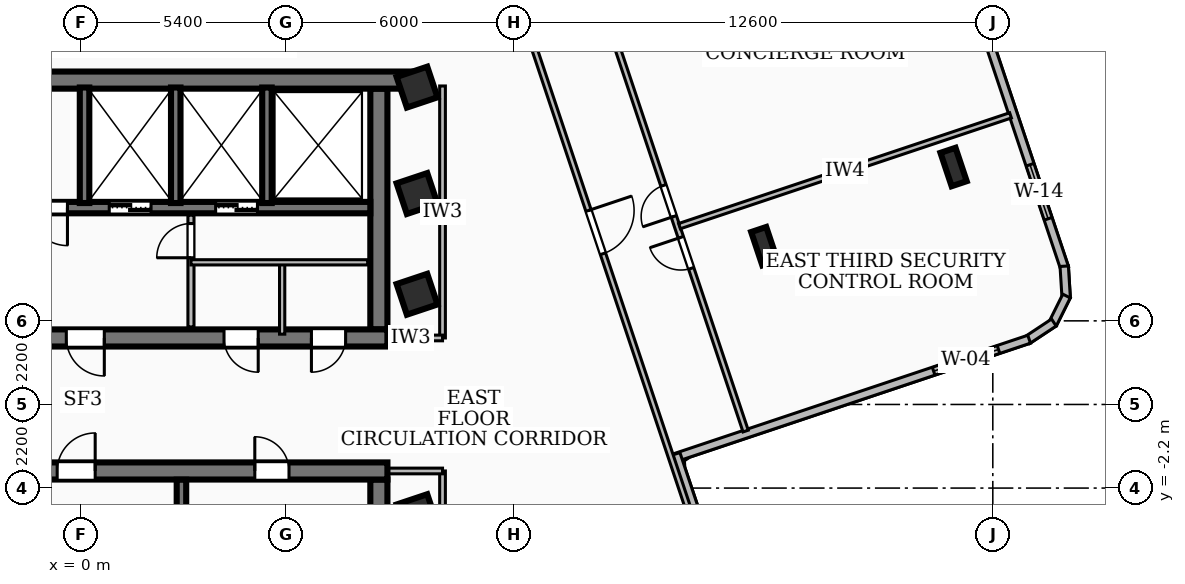
"""IFC4 building model, lengths in metres.
Left out: names, types, materials, properties, quantities, classifications, styles, units other than length and angle.
Written with IfcOpenShell. Run it as: python <this file> out.ifc"""

import sys

from ifc_helpers import new_model, si_unit, direction, frame, frame_2d, origin, origin_2d, place, context, subcontext, project, spatial, rectangle, i_section, extrude, element, fill, save


model = new_model("IFC4")
c1 = context("Model", 3, precision=1e-05, world=origin(), true_north=direction((0.0, 1.0)))
c2 = subcontext(c1, "Body", "Model", "MODEL_VIEW")
j1 = project(units=[si_unit("LENGTHUNIT", "METRE"), si_unit("PLANEANGLEUNIT", "RADIAN")], contexts=[c1])
p1 = place(None, origin())
s1 = spatial("IfcSite", under=j1, at=p1, CompositionType="ELEMENT")
p2 = place(p1, origin())
s2 = spatial("IfcBuilding", under=s1, at=p2, CompositionType="ELEMENT")
p3 = place(p2, frame((0.0, 0.0, 159.48)))
s3 = spatial("IfcBuildingStorey", under=s2, at=p3, CompositionType="ELEMENT", Elevation=159.48)
p4 = place(p3, frame((-8.78, 8.535, 0.0), z_axis=(0.0, 0.0, 1.0), x_axis=(1.0, 0.0, 0.0)))
e1 = element("IfcWall", 1, at=p4, inside=s3, PredefinedType="SHEAR", context=c2, shape_type="SweptSolid", body=[
    extrude(rectangle(XDim=17.56, YDim=0.45, at=frame_2d((8.78, 0.0))), origin(), (0.0, 0.0, 1.0), 3.34),
])
p5 = place(p3, frame((8.07, 1.75, 0.0), z_axis=(0.0, 0.0, 1.0), x_axis=(-1.0, 0.0, 0.0)))
e2 = element("IfcWall", 2, at=p5, inside=s3, PredefinedType="SHEAR", context=c2, shape_type="SweptSolid", body=[
    extrude(rectangle(XDim=16.14, YDim=0.45, at=frame_2d((8.07, 0.0))), origin(), (0.0, 0.0, 1.0), 3.34),
])
p6 = place(p5, frame((7.45, 0.0, 0.0)))
e3 = element("IfcOpeningElement", 3, at=p6, cuts=e2, PredefinedType="OPENING", context=c2, shape_type="SweptSolid", body=[
    extrude(rectangle(XDim=1.0, YDim=2.1, at=frame_2d((0.5, 1.05))), frame((0.0, 0.235, 0.0), z_axis=(0.0, -1.0, 0.0), x_axis=(1.0, 0.0, 0.0)), (0.0, 0.0, 1.0), 0.47),
])
p7 = place(p5, frame((3.4, 0.0, 0.0)))
e4 = element("IfcOpeningElement", 4, at=p7, cuts=e2, PredefinedType="OPENING", context=c2, shape_type="SweptSolid", body=[
    extrude(rectangle(XDim=0.9, YDim=2.06, at=frame_2d((0.45, 1.03))), frame((0.0, 0.235, 0.0), z_axis=(0.0, -1.0, 0.0), x_axis=(1.0, 0.0, 0.0)), (0.0, 0.0, 1.0), 0.47),
])
p8 = place(p5, frame((1.1, 0.0, 0.0)))
e5 = element("IfcOpeningElement", 5, at=p8, cuts=e2, PredefinedType="OPENING", context=c2, shape_type="SweptSolid", body=[
    extrude(rectangle(XDim=0.9, YDim=2.06, at=frame_2d((0.45, 1.03))), frame((0.0, 0.235, 0.0), z_axis=(0.0, -1.0, 0.0), x_axis=(1.0, 0.0, 0.0)), (0.0, 0.0, 1.0), 0.47),
])
p9 = place(p3, frame((7.845, 8.31, 0.0), z_axis=(0.0, 0.0, 1.0), x_axis=(0.0, -1.0, 0.0)))
e6 = element("IfcWall", 6, at=p9, inside=s3, PredefinedType="SHEAR", context=c2, shape_type="SweptSolid", body=[
    extrude(rectangle(XDim=6.335, YDim=0.45, at=frame_2d((3.167, 0.0))), origin(), (0.0, 0.0, 1.0), 3.34),
])
p10 = place(p3, frame((7.62, 5.18, 0.0), z_axis=(0.0, 0.0, 1.0), x_axis=(-1.0, 0.0, 0.0)))
e7 = element("IfcWall", 7, at=p10, inside=s3, PredefinedType="SOLIDWALL", context=c2, shape_type="SweptSolid", body=[
    extrude(rectangle(XDim=15.24, YDim=0.3, at=frame_2d((7.62, 0.0))), origin(), (0.0, 0.0, 1.0), 3.34),
])
p11 = place(p10, frame((5.77, 0.0, 0.0)))
e8 = element("IfcOpeningElement", 8, at=p11, cuts=e7, PredefinedType="OPENING", context=c2, shape_type="SweptSolid", body=[
    extrude(rectangle(XDim=1.1, YDim=2.15, at=frame_2d((0.55, 1.075))), frame((0.0, 0.16, 0.0), z_axis=(0.0, -1.0, 0.0), x_axis=(1.0, 0.0, 0.0)), (0.0, 0.0, 1.0), 0.32),
])
p12 = place(p10, frame((2.97, 0.0, 0.0)))
e9 = element("IfcOpeningElement", 9, at=p12, cuts=e7, PredefinedType="OPENING", context=c2, shape_type="SweptSolid", body=[
    extrude(rectangle(XDim=1.1, YDim=2.15, at=frame_2d((0.55, 1.075))), frame((0.0, 0.16, 0.0), z_axis=(0.0, -1.0, 0.0), x_axis=(1.0, 0.0, 0.0)), (0.0, 0.0, 1.0), 0.32),
])
p13 = place(p10, frame((7.97, 0.0, 0.0)))
e10 = element("IfcOpeningElement", 10, at=p13, cuts=e7, PredefinedType="OPENING", context=c2, shape_type="SweptSolid", body=[
    extrude(rectangle(XDim=1.0, YDim=2.1, at=frame_2d((0.5, 1.05))), frame((0.0, 0.16, 0.0), z_axis=(0.0, -1.0, 0.0), x_axis=(1.0, 0.0, 0.0)), (0.0, 0.0, 1.0), 0.32),
])
p14 = place(p3, frame((-8.07, -1.75, 0.0), z_axis=(0.0, 0.0, 1.0), x_axis=(1.0, 0.0, 0.0)))
e11 = element("IfcWall", 11, at=p14, inside=s3, PredefinedType="SHEAR", context=c2, shape_type="SweptSolid", body=[
    extrude(rectangle(XDim=16.14, YDim=0.45, at=frame_2d((8.07, 0.0))), origin(), (0.0, 0.0, 1.0), 3.34),
])
p15 = place(p14, frame((7.45, 0.0, 0.0)))
e12 = element("IfcOpeningElement", 12, at=p15, cuts=e11, PredefinedType="OPENING", context=c2, shape_type="SweptSolid", body=[
    extrude(rectangle(XDim=1.0, YDim=2.1, at=frame_2d((0.5, 1.05))), frame((0.0, 0.235, 0.0), z_axis=(0.0, -1.0, 0.0), x_axis=(1.0, 0.0, 0.0)), (0.0, 0.0, 1.0), 0.47),
])
p16 = place(p14, frame((12.65, 0.0, 0.0)))
e13 = element("IfcOpeningElement", 13, at=p16, cuts=e11, PredefinedType="OPENING", context=c2, shape_type="SweptSolid", body=[
    extrude(rectangle(XDim=0.9, YDim=2.06, at=frame_2d((0.45, 1.03))), frame((0.0, 0.235, 0.0), z_axis=(0.0, -1.0, 0.0), x_axis=(1.0, 0.0, 0.0)), (0.0, 0.0, 1.0), 0.47),
])
p17 = place(p14, frame((0.565, 0.0, 0.0)))
e14 = element("IfcOpeningElement", 14, at=p17, cuts=e11, PredefinedType="OPENING", context=c2, shape_type="SweptSolid", body=[
    extrude(rectangle(XDim=1.05, YDim=2.15, at=frame_2d((0.525, 1.075))), frame((0.0, 0.235, 0.0), z_axis=(0.0, -1.0, 0.0), x_axis=(1.0, 0.0, 0.0)), (0.0, 0.0, 1.0), 0.47),
])
p18 = place(p14, frame((2.125, 0.0, 0.0)))
e15 = element("IfcOpeningElement", 15, at=p18, cuts=e11, PredefinedType="OPENING", context=c2, shape_type="SweptSolid", body=[
    extrude(rectangle(XDim=1.05, YDim=2.15, at=frame_2d((0.525, 1.075))), frame((0.0, 0.235, 0.0), z_axis=(0.0, -1.0, 0.0), x_axis=(1.0, 0.0, 0.0)), (0.0, 0.0, 1.0), 0.47),
])
p19 = place(p14, frame((3.685, 0.0, 0.0)))
e16 = element("IfcOpeningElement", 16, at=p19, cuts=e11, PredefinedType="OPENING", context=c2, shape_type="SweptSolid", body=[
    extrude(rectangle(XDim=1.05, YDim=2.15, at=frame_2d((0.525, 1.075))), frame((0.0, 0.235, 0.0), z_axis=(0.0, -1.0, 0.0), x_axis=(1.0, 0.0, 0.0)), (0.0, 0.0, 1.0), 0.47),
])
p20 = place(p3, frame((7.845, -1.975, 0.0), z_axis=(0.0, 0.0, 1.0), x_axis=(0.0, -1.0, 0.0)))
e17 = element("IfcWall", 17, at=p20, inside=s3, PredefinedType="SHEAR", context=c2, shape_type="SweptSolid", body=[
    extrude(rectangle(XDim=6.335, YDim=0.45, at=frame_2d((3.167, 0.0))), origin(), (0.0, 0.0, 1.0), 3.34),
])
for number, where, z_axis, x_axis in (
    (18, (0.1, 5.3, 0.0), (0.0, 0.0, 1.0), (0.0, 1.0, 0.0)),
    (19, (2.5, 5.3, 0.0), (0.0, 0.0, 1.0), (0.0, 1.0, 0.0)),
    (20, (4.9, 5.3, 0.0), (0.0, 0.0, 1.0), (0.0, 1.0, 0.0)),
):
    element("IfcWall", number, at=place(p3, frame(where, z_axis=z_axis, x_axis=x_axis)), inside=s3, PredefinedType="SOLIDWALL", context=c2, shape_type="SweptSolid", body=[
        extrude(rectangle(XDim=3.04, YDim=0.25, at=frame_2d((1.52, 0.0))), origin(), (0.0, 0.0, 1.0), 3.34),
    ])
p21 = place(p3, frame((2.65, -5.05, 0.0), z_axis=(0.0, 0.0, 1.0), x_axis=(0.0, 1.0, 0.0)))
e21 = element("IfcWall", 21, at=p21, inside=s3, PredefinedType="SOLIDWALL", context=c2, shape_type="SweptSolid", body=[
    extrude(rectangle(XDim=3.07, YDim=0.25, at=frame_2d((1.535, 0.0))), origin(), (0.0, 0.0, 1.0), 3.34),
])
for number, where, z_axis, x_axis in (
    (22, (8.85, -2.9, 0.0), (0.0, 0.0, 1.0), (0.948, 0.317, 0.0)),
    (23, (8.85, 2.9, 0.0), (0.0, 0.0, 1.0), (0.948, 0.317, 0.0)),
    (24, (8.85, 5.55, 0.0), (0.0, 0.0, 1.0), (0.948, 0.317, 0.0)),
    (25, (8.85, 8.35, 0.0), (0.0, 0.0, 1.0), (0.948, 0.317, 0.0)),
):
    element("IfcColumn", number, at=place(p3, frame(where, z_axis=z_axis, x_axis=x_axis)), inside=s3, PredefinedType="COLUMN", context=c2, shape_type="SweptSolid", body=[
        extrude(rectangle(XDim=0.85, YDim=0.85, at=origin_2d()), origin(), (0.0, 0.0, 1.0), 3.6),
    ])
for number, where, z_axis, x_axis in (
    (26, (17.987, 4.164, 0.0), (0.0, 0.0, 1.0), (0.948, 0.317, 0.0)),
    (27, (22.968, 6.248, 0.0), (0.0, 0.0, 1.0), (0.948, 0.317, 0.0)),
):
    element("IfcColumn", number, at=place(p3, frame(where, z_axis=z_axis, x_axis=x_axis)), inside=s3, PredefinedType="COLUMN", context=c2, shape_type="SweptSolid", body=[
        extrude(i_section(OverallWidth=0.418, OverallDepth=0.927, WebThickness=0.019, FlangeThickness=0.032, at=origin_2d()), origin(), (0.0, 0.0, 1.0), 3.6),
    ])
p22 = place(p3, frame((22.836, 12.714, 0.0), z_axis=(0.0, 0.0, 1.0), x_axis=(0.317285610931, -0.94833002752, 0.0)))
e28 = element("IfcWall", 28, at=p22, inside=s3, PredefinedType="SOLIDWALL", context=c2, shape_type="SweptSolid", body=[
    extrude(rectangle(XDim=9.622, YDim=0.22, at=frame_2d((4.811, 0.0))), origin(), (0.0, 0.0, 1.0), 3.34),
])
p23 = place(p22, frame((6.755, 0.0, 0.85)))
e29 = element("IfcOpeningElement", 29, at=p23, cuts=e28, PredefinedType="OPENING", context=c2, shape_type="SweptSolid", body=[
    extrude(rectangle(XDim=1.5, YDim=1.5, at=frame_2d((0.75, 0.75))), frame((0.0, 0.12, 0.0), z_axis=(0.0, -1.0, 0.0), x_axis=(1.0, 0.0, 0.0)), (0.0, 0.0, 1.0), 0.24),
])
p24 = place(p3, frame((25.879, 3.638, 0.0), z_axis=(0.0, 0.0, 1.0), x_axis=(0.062378286155, -0.998052578483, 0.0)))
e30 = element("IfcWall", 30, at=p24, inside=s3, PredefinedType="SOLIDWALL", context=c2, shape_type="SweptSolid", body=[
    extrude(rectangle(XDim=0.834, YDim=0.22, at=frame_2d((0.417, 0.0))), origin(), (0.0, 0.0, 1.0), 3.34),
])
p25 = place(p3, frame((25.94, 2.853, 0.0), z_axis=(0.0, 0.0, 1.0), x_axis=(-0.445781750405, -0.895141682085, 0.0)))
e31 = element("IfcWall", 31, at=p25, inside=s3, PredefinedType="SOLIDWALL", context=c2, shape_type="SweptSolid", body=[
    extrude(rectangle(XDim=0.819, YDim=0.22, at=frame_2d((0.409, 0.0))), origin(), (0.0, 0.0, 1.0), 3.34),
])
p26 = place(p3, frame((25.607, 2.156, 0.0), z_axis=(0.0, 0.0, 1.0), x_axis=(-0.833756011094, -0.552133058206, 0.0)))
e32 = element("IfcWall", 32, at=p26, inside=s3, PredefinedType="SOLIDWALL", context=c2, shape_type="SweptSolid", body=[
    extrude(rectangle(XDim=0.835, YDim=0.22, at=frame_2d((0.417, 0.0))), origin(), (0.0, 0.0, 1.0), 3.34),
])
p27 = place(p3, frame((24.956, 1.717, 0.0), z_axis=(0.0, 0.0, 1.0), x_axis=(-0.948331055834, -0.317282537404, 0.0)))
e33 = element("IfcWall", 33, at=p27, inside=s3, PredefinedType="SOLIDWALL", context=c2, shape_type="SweptSolid", body=[
    extrude(rectangle(XDim=9.858, YDim=0.22, at=frame_2d((4.929, 0.0))), origin(), (0.0, 0.0, 1.0), 3.34),
])
p28 = place(p27, frame((0.85, 0.0, 0.85)))
e34 = element("IfcOpeningElement", 34, at=p28, cuts=e33, PredefinedType="OPENING", context=c2, shape_type="SweptSolid", body=[
    extrude(rectangle(XDim=1.8, YDim=2.0, at=frame_2d((0.9, 1.0))), frame((0.0, 0.12, 0.0), z_axis=(0.0, -1.0, 0.0), x_axis=(1.0, 0.0, 0.0)), (0.0, 0.0, 1.0), 0.24),
])
p29 = place(p3, frame((15.662, -1.3, 0.0), z_axis=(0.0, 0.0, 1.0), x_axis=(0.317224676093, -0.948350412494, 0.0)))
e35 = element("IfcWall", 35, at=p29, inside=s3, PredefinedType="SOLIDWALL", context=c2, shape_type="SweptSolid", body=[
    extrude(rectangle(XDim=6.758, YDim=0.22, at=frame_2d((3.379, 0.0))), origin(), (0.0, 0.0, 1.0), 3.34),
])
p30 = place(p3, frame((2.9, 2.04, 0.0), z_axis=(0.0, 0.0, 1.0), x_axis=(0.0, 1.0, 0.0)))
e36 = element("IfcWall", 36, at=p30, inside=s3, PredefinedType="PARTITIONING", context=c2, shape_type="SweptSolid", body=[
    extrude(rectangle(XDim=2.94, YDim=0.16, at=frame_2d((1.47, 0.0))), origin(), (0.0, 0.0, 1.0), 2.57),
])
p31 = place(p30, frame((1.82, 0.0, 0.0)))
e37 = element("IfcOpeningElement", 37, at=p31, cuts=e36, PredefinedType="OPENING", context=c2, shape_type="SweptSolid", body=[
    extrude(rectangle(XDim=0.9, YDim=2.06, at=frame_2d((0.45, 1.03))), frame((0.0, 0.09, 0.0), z_axis=(0.0, -1.0, 0.0), x_axis=(1.0, 0.0, 0.0)), (0.0, 0.0, 1.0), 0.18),
])
p32 = place(p3, frame((2.9, 3.74, 0.0), z_axis=(0.0, 0.0, 1.0), x_axis=(1.0, 0.0, 0.0)))
e38 = element("IfcWall", 38, at=p32, inside=s3, PredefinedType="PARTITIONING", context=c2, shape_type="SweptSolid", body=[
    extrude(rectangle(XDim=4.65, YDim=0.138, at=frame_2d((2.325, 0.0))), origin(), (0.0, 0.0, 1.0), 3.34),
])
p33 = place(p3, frame((5.3, 1.85, 0.0), z_axis=(0.0, 0.0, 1.0), x_axis=(0.0, 1.0, 0.0)))
e39 = element("IfcWall", 39, at=p33, inside=s3, PredefinedType="PARTITIONING", context=c2, shape_type="SweptSolid", body=[
    extrude(rectangle(XDim=1.89, YDim=0.138, at=frame_2d((0.945, 0.0))), origin(), (0.0, 0.0, 1.0), 2.57),
])
p34 = place(p3, frame((9.52, 1.75, 0.0), z_axis=(0.0, 0.0, 1.0), x_axis=(0.0, 1.0, 0.0)))
e40 = element("IfcWall", 40, at=p34, inside=s3, PredefinedType="PARTITIONING", context=c2, shape_type="SweptSolid", body=[
    extrude(rectangle(XDim=6.63, YDim=0.15, at=frame_2d((3.315, 0.0))), origin(), (0.0, 0.0, 1.0), 2.644),
])
p35 = place(p3, frame((7.85, 1.75, 0.0), z_axis=(0.0, 0.0, 1.0), x_axis=(1.0, 0.0, 0.0)))
e41 = element("IfcWall", 41, at=p35, inside=s3, PredefinedType="PARTITIONING", context=c2, shape_type="SweptSolid", body=[
    extrude(rectangle(XDim=1.67, YDim=0.15, at=frame_2d((0.835, 0.0))), origin(), (0.0, 0.0, 1.0), 2.57),
])
p36 = place(p3, frame((9.52, -8.38, 0.0), z_axis=(0.0, 0.0, 1.0), x_axis=(0.0, 1.0, 0.0)))
e42 = element("IfcWall", 42, at=p36, inside=s3, PredefinedType="PARTITIONING", context=c2, shape_type="SweptSolid", body=[
    extrude(rectangle(XDim=6.63, YDim=0.15, at=frame_2d((3.315, 0.0))), origin(), (0.0, 0.0, 1.0), 3.34),
])
p37 = place(p3, frame((7.85, -1.75, 0.0), z_axis=(0.0, 0.0, 1.0), x_axis=(1.0, 0.0, 0.0)))
e43 = element("IfcWall", 43, at=p37, inside=s3, PredefinedType="PARTITIONING", context=c2, shape_type="SweptSolid", body=[
    extrude(rectangle(XDim=1.67, YDim=0.15, at=frame_2d((0.835, 0.0))), origin(), (0.0, 0.0, 1.0), 2.57),
])
p38 = place(p3, frame((10.372, 14.037, 0.0), z_axis=(0.0, 0.0, 1.0), x_axis=(0.317298382655, -0.94832575435, 0.0)))
e44 = element("IfcWall", 44, at=p38, inside=s3, PredefinedType="PARTITIONING", context=c2, shape_type="SweptSolid", body=[
    extrude(rectangle(XDim=20.041, YDim=0.145, at=frame_2d((10.021, 0.0))), origin(), (0.0, 0.0, 1.0), 2.644),
])
p39 = place(p38, frame((9.42, 0.0, 0.0)))
e45 = element("IfcOpeningElement", 45, at=p39, cuts=e44, PredefinedType="OPENING", context=c2, shape_type="SweptSolid", body=[
    extrude(rectangle(XDim=1.2, YDim=2.1, at=frame_2d((0.6, 1.05))), frame((0.0, 0.083, 0.0), z_axis=(0.0, -1.0, 0.0), x_axis=(1.0, 0.0, 0.0)), (0.0, 0.0, 1.0), 0.165),
])
p40 = place(p3, frame((15.755, 4.692, 0.0), z_axis=(0.0, 0.0, 1.0), x_axis=(0.94831322287, 0.317335833667, 0.0)))
e46 = element("IfcWall", 46, at=p40, inside=s3, PredefinedType="PARTITIONING", context=c2, shape_type="SweptSolid", body=[
    extrude(rectangle(XDim=9.186, YDim=0.145, at=frame_2d((4.593, 0.0))), origin(), (0.0, 0.0, 1.0), 2.793),
])
p41 = place(p3, frame((17.496, -0.7, 0.0), z_axis=(0.0, 0.0, 1.0), x_axis=(-0.317299961245, 0.948325226172, 0.0)))
e47 = element("IfcWall", 47, at=p41, inside=s3, PredefinedType="PARTITIONING", context=c2, shape_type="SweptSolid", body=[
    extrude(rectangle(XDim=12.43, YDim=0.145, at=frame_2d((6.215, 0.0))), origin(), (0.0, 0.0, 1.0), 2.644),
])
p42 = place(p41, frame((4.515, 0.0, 0.0)))
e48 = element("IfcOpeningElement", 48, at=p42, cuts=e47, PredefinedType="OPENING", context=c2, shape_type="SweptSolid", body=[
    extrude(rectangle(XDim=0.86, YDim=2.04, at=frame_2d((0.43, 1.02))), frame((0.0, 0.083, 0.0), z_axis=(0.0, -1.0, 0.0), x_axis=(1.0, 0.0, 0.0)), (0.0, 0.0, 1.0), 0.165),
])
p43 = place(p41, frame((5.955, 0.0, 0.0)))
e49 = element("IfcOpeningElement", 49, at=p43, cuts=e47, PredefinedType="OPENING", context=c2, shape_type="SweptSolid", body=[
    extrude(rectangle(XDim=0.86, YDim=2.04, at=frame_2d((0.43, 1.02))), frame((0.0, 0.083, 0.0), z_axis=(0.0, -1.0, 0.0), x_axis=(1.0, 0.0, 0.0)), (0.0, 0.0, 1.0), 0.165),
])
p44 = place(p23, origin())
e50 = element("IfcWindow", 50, at=p44, inside=s3, PartitioningType="SINGLE_PANEL", PredefinedType="WINDOW", context=c2, shape_type="SweptSolid", body=[
    extrude(rectangle(XDim=1.5, YDim=1.5, at=frame_2d((0.75, 0.75))), frame((0.0, 0.03, 0.0), z_axis=(0.0, -1.0, 0.0), x_axis=(1.0, 0.0, 0.0)), (0.0, 0.0, 1.0), 0.06),
])
fill(e29, e50)
p45 = place(p28, origin())
e51 = element("IfcWindow", 51, at=p45, inside=s3, PartitioningType="SINGLE_PANEL", PredefinedType="WINDOW", context=c2, shape_type="SweptSolid", body=[
    extrude(rectangle(XDim=1.8, YDim=2.0, at=frame_2d((0.9, 1.0))), frame((0.0, 0.03, 0.0), z_axis=(0.0, -1.0, 0.0), x_axis=(1.0, 0.0, 0.0)), (0.0, 0.0, 1.0), 0.06),
])
fill(e34, e51)
p46 = place(p6, origin())
e52 = element("IfcDoor", 52, at=p46, inside=s3, OperationType="SINGLE_SWING_LEFT", PredefinedType="DOOR", context=c2, shape_type="SweptSolid", body=[
    extrude(rectangle(XDim=1.0, YDim=2.1, at=frame_2d((0.5, 1.05))), frame((0.0, 0.025, 0.0), z_axis=(0.0, -1.0, 0.0), x_axis=(1.0, 0.0, 0.0)), (0.0, 0.0, 1.0), 0.05),
])
fill(e3, e52)
p47 = place(p15, origin())
e53 = element("IfcDoor", 53, at=p47, inside=s3, OperationType="SINGLE_SWING_RIGHT", PredefinedType="DOOR", context=c2, shape_type="SweptSolid", body=[
    extrude(rectangle(XDim=1.0, YDim=2.1, at=frame_2d((0.5, 1.05))), frame((0.0, 0.025, 0.0), z_axis=(0.0, -1.0, 0.0), x_axis=(1.0, 0.0, 0.0)), (0.0, 0.0, 1.0), 0.05),
])
fill(e12, e53)
p48 = place(p11, origin())
e54 = element("IfcDoor", 54, at=p48, inside=s3, OperationType="DOUBLE_DOOR_SLIDING", PredefinedType="DOOR", context=c2, shape_type="SweptSolid", body=[
    extrude(rectangle(XDim=1.1, YDim=2.15, at=frame_2d((0.55, 1.075))), frame((0.0, 0.025, 0.0), z_axis=(0.0, -1.0, 0.0), x_axis=(1.0, 0.0, 0.0)), (0.0, 0.0, 1.0), 0.05),
])
fill(e8, e54)
p49 = place(p12, origin())
e55 = element("IfcDoor", 55, at=p49, inside=s3, OperationType="DOUBLE_DOOR_SLIDING", PredefinedType="DOOR", context=c2, shape_type="SweptSolid", body=[
    extrude(rectangle(XDim=1.1, YDim=2.15, at=frame_2d((0.55, 1.075))), frame((0.0, 0.025, 0.0), z_axis=(0.0, -1.0, 0.0), x_axis=(1.0, 0.0, 0.0)), (0.0, 0.0, 1.0), 0.05),
])
fill(e9, e55)
p50 = place(p13, origin())
e56 = element("IfcDoor", 56, at=p50, inside=s3, OperationType="SINGLE_SWING_LEFT", PredefinedType="DOOR", context=c2, shape_type="SweptSolid", body=[
    extrude(rectangle(XDim=1.0, YDim=2.1, at=frame_2d((0.5, 1.05))), frame((0.0, 0.025, 0.0), z_axis=(0.0, -1.0, 0.0), x_axis=(1.0, 0.0, 0.0)), (0.0, 0.0, 1.0), 0.05),
])
fill(e10, e56)
p51 = place(p16, origin())
e57 = element("IfcDoor", 57, at=p51, inside=s3, OperationType="SINGLE_SWING_LEFT", PredefinedType="DOOR", context=c2, shape_type="SweptSolid", body=[
    extrude(rectangle(XDim=0.9, YDim=2.06, at=frame_2d((0.45, 1.03))), frame((0.0, 0.025, 0.0), z_axis=(0.0, -1.0, 0.0), x_axis=(1.0, 0.0, 0.0)), (0.0, 0.0, 1.0), 0.05),
])
fill(e13, e57)
p52 = place(p7, origin())
e58 = element("IfcDoor", 58, at=p52, inside=s3, OperationType="SINGLE_SWING_LEFT", PredefinedType="DOOR", context=c2, shape_type="SweptSolid", body=[
    extrude(rectangle(XDim=0.9, YDim=2.06, at=frame_2d((0.45, 1.03))), frame((0.0, 0.025, 0.0), z_axis=(0.0, -1.0, 0.0), x_axis=(1.0, 0.0, 0.0)), (0.0, 0.0, 1.0), 0.05),
])
fill(e4, e58)
p53 = place(p8, origin())
e59 = element("IfcDoor", 59, at=p53, inside=s3, OperationType="SINGLE_SWING_RIGHT", PredefinedType="DOOR", context=c2, shape_type="SweptSolid", body=[
    extrude(rectangle(XDim=0.9, YDim=2.06, at=frame_2d((0.45, 1.03))), frame((0.0, 0.025, 0.0), z_axis=(0.0, -1.0, 0.0), x_axis=(1.0, 0.0, 0.0)), (0.0, 0.0, 1.0), 0.05),
])
fill(e5, e59)
p54 = place(p31, origin())
e60 = element("IfcDoor", 60, at=p54, inside=s3, OperationType="SINGLE_SWING_LEFT", PredefinedType="DOOR", context=c2, shape_type="SweptSolid", body=[
    extrude(rectangle(XDim=0.9, YDim=2.06, at=frame_2d((0.45, 1.03))), frame((0.0, 0.025, 0.0), z_axis=(0.0, -1.0, 0.0), x_axis=(1.0, 0.0, 0.0)), (0.0, 0.0, 1.0), 0.05),
])
fill(e37, e60)
p55 = place(p39, origin())
e61 = element("IfcDoor", 61, at=p55, inside=s3, OperationType="SINGLE_SWING_LEFT", PredefinedType="DOOR", context=c2, shape_type="SweptSolid", body=[
    extrude(rectangle(XDim=1.2, YDim=2.1, at=frame_2d((0.6, 1.05))), frame((0.0, 0.025, 0.0), z_axis=(0.0, -1.0, 0.0), x_axis=(1.0, 0.0, 0.0)), (0.0, 0.0, 1.0), 0.05),
])
fill(e45, e61)
p56 = place(p42, origin())
e62 = element("IfcDoor", 62, at=p56, inside=s3, OperationType="SINGLE_SWING_RIGHT", PredefinedType="DOOR", context=c2, shape_type="SweptSolid", body=[
    extrude(rectangle(XDim=0.86, YDim=2.04, at=frame_2d((0.43, 1.02))), frame((0.0, 0.025, 0.0), z_axis=(0.0, -1.0, 0.0), x_axis=(1.0, 0.0, 0.0)), (0.0, 0.0, 1.0), 0.05),
])
fill(e48, e62)
p57 = place(p43, origin())
e63 = element("IfcDoor", 63, at=p57, inside=s3, OperationType="SINGLE_SWING_LEFT", PredefinedType="DOOR", context=c2, shape_type="SweptSolid", body=[
    extrude(rectangle(XDim=0.86, YDim=2.04, at=frame_2d((0.43, 1.02))), frame((0.0, 0.025, 0.0), z_axis=(0.0, -1.0, 0.0), x_axis=(1.0, 0.0, 0.0)), (0.0, 0.0, 1.0), 0.05),
])
fill(e49, e63)
save(model, sys.argv[1])
